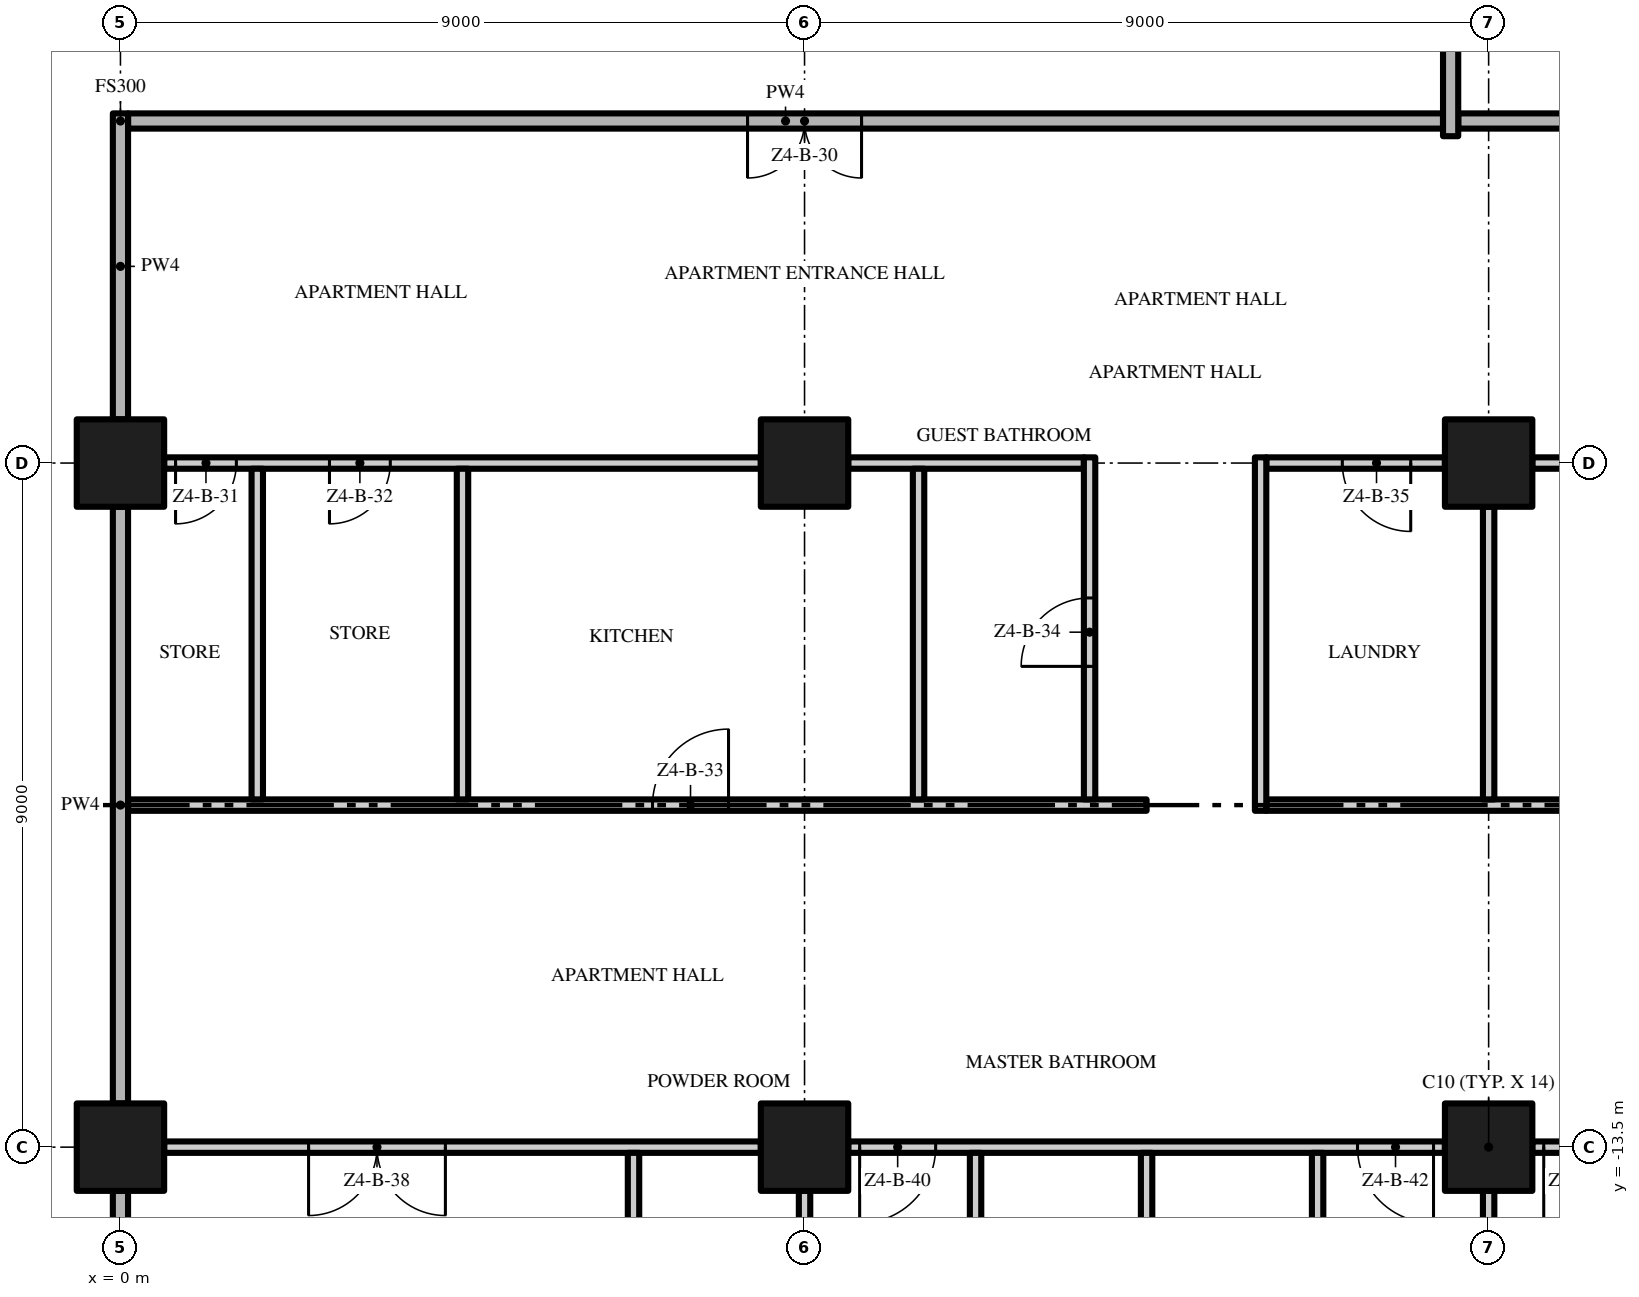
"""IFC4 building model, lengths in metres.
Left out: names, types, materials, properties, quantities, classifications, styles, units other than length and angle.
Written with IfcOpenShell. Run it as: python <this file> out.ifc"""

import sys

from ifc_helpers import new_model, si_unit, direction, frame, frame_2d, origin, origin_2d, place, context, subcontext, project, spatial, rectangle, extrude, element, fill, save


model = new_model("IFC4")
c1 = context("Model", 3, precision=1e-05, world=origin(), true_north=direction((0.0, 1.0)))
c2 = subcontext(c1, "Body", "Model", "MODEL_VIEW")
j1 = project(units=[si_unit("LENGTHUNIT", "METRE"), si_unit("PLANEANGLEUNIT", "RADIAN")], contexts=[c1])
p1 = place(None, origin())
s1 = spatial("IfcSite", under=j1, at=p1, CompositionType="ELEMENT")
p2 = place(p1, origin())
s2 = spatial("IfcBuilding", under=s1, at=p2, CompositionType="ELEMENT")
p3 = place(p2, frame((0.0, 0.0, 195.8)))
s3 = spatial("IfcBuildingStorey", under=s2, at=p3, CompositionType="ELEMENT", Elevation=195.8)
for number, where, z_axis, x_axis in (
    (1, (0.0, -13.5, 0.0), (0.0, 0.0, 1.0), (1.0, 0.0, 0.0)),
    (2, (0.0, -4.5, 0.0), (0.0, 0.0, 1.0), (1.0, 0.0, 0.0)),
    (3, (18.0, -13.5, 0.0), (0.0, 0.0, 1.0), (1.0, 0.0, 0.0)),
    (4, (18.0, -4.5, 0.0), (0.0, 0.0, 1.0), (1.0, 0.0, 0.0)),
    (5, (9.0, -13.5, 0.0), (0.0, 0.0, 1.0), (1.0, 0.0, 0.0)),
    (6, (9.0, -4.5, 0.0), (0.0, 0.0, 1.0), (1.0, 0.0, 0.0)),
):
    element("IfcColumn", number, at=place(p3, frame(where, z_axis=z_axis, x_axis=x_axis)), inside=s3, PredefinedType="COLUMN", context=c2, shape_type="SweptSolid", body=[
        extrude(rectangle(XDim=1.15, YDim=1.15, at=origin_2d()), origin(), (0.0, 0.0, 1.0), 3.5),
    ])
p4 = place(p3, frame((8.425, -13.5, 0.0), z_axis=(0.0, 0.0, 1.0), x_axis=(-1.0, 0.0, 0.0)))
e7 = element("IfcWall", 7, at=p4, inside=s3, PredefinedType="PARTITIONING", context=c2, shape_type="SweptSolid", body=[
    extrude(rectangle(XDim=7.85, YDim=0.15, at=frame_2d((3.925, 0.0))), origin(), (0.0, 0.0, 1.0), 3.5),
])
p5 = place(p4, frame((4.15, 0.0, 0.0)))
e8 = element("IfcOpeningElement", 8, at=p5, cuts=e7, PredefinedType="OPENING", context=c2, shape_type="SweptSolid", body=[
    extrude(rectangle(XDim=1.8, YDim=2.4, at=frame_2d((0.9, 1.2))), frame((0.0, 0.085, 0.0), z_axis=(0.0, -1.0, 0.0), x_axis=(1.0, 0.0, 0.0)), (0.0, 0.0, 1.0), 0.17),
])
p6 = place(p3, frame((17.425, -13.5, 0.0), z_axis=(0.0, 0.0, 1.0), x_axis=(-1.0, 0.0, 0.0)))
e9 = element("IfcWall", 9, at=p6, inside=s3, PredefinedType="PARTITIONING", context=c2, shape_type="SweptSolid", body=[
    extrude(rectangle(XDim=7.85, YDim=0.15, at=frame_2d((3.925, 0.0))), origin(), (0.0, 0.0, 1.0), 3.5),
])
p7 = place(p6, frame((6.7, 0.0, 0.0)))
e10 = element("IfcOpeningElement", 10, at=p7, cuts=e9, PredefinedType="OPENING", context=c2, shape_type="SweptSolid", body=[
    extrude(rectangle(XDim=1.0, YDim=2.4, at=frame_2d((0.5, 1.2))), frame((0.0, 0.085, 0.0), z_axis=(0.0, -1.0, 0.0), x_axis=(1.0, 0.0, 0.0)), (0.0, 0.0, 1.0), 0.17),
])
p8 = place(p6, frame((0.15, 0.0, 0.0)))
e11 = element("IfcOpeningElement", 11, at=p8, cuts=e9, PredefinedType="OPENING", context=c2, shape_type="SweptSolid", body=[
    extrude(rectangle(XDim=1.0, YDim=2.4, at=frame_2d((0.5, 1.2))), frame((0.0, 0.085, 0.0), z_axis=(0.0, -1.0, 0.0), x_axis=(1.0, 0.0, 0.0)), (0.0, 0.0, 1.0), 0.17),
])
p9 = place(p3, frame((25.95, -13.5, 0.0), z_axis=(0.0, 0.0, 1.0), x_axis=(-1.0, 0.0, 0.0)))
e12 = element("IfcWall", 12, at=p9, inside=s3, PredefinedType="PARTITIONING", context=c2, shape_type="SweptSolid", body=[
    extrude(rectangle(XDim=7.375, YDim=0.15, at=frame_2d((3.688, 0.0))), origin(), (0.0, 0.0, 1.0), 3.5),
])
p10 = place(p9, frame((6.225, 0.0, 0.0)))
e13 = element("IfcOpeningElement", 13, at=p10, cuts=e12, PredefinedType="OPENING", context=c2, shape_type="SweptSolid", body=[
    extrude(rectangle(XDim=1.0, YDim=2.4, at=frame_2d((0.5, 1.2))), frame((0.0, 0.085, 0.0), z_axis=(0.0, -1.0, 0.0), x_axis=(1.0, 0.0, 0.0)), (0.0, 0.0, 1.0), 0.17),
])
p11 = place(p9, frame((0.7, 0.0, 0.0)))
e14 = element("IfcOpeningElement", 14, at=p11, cuts=e12, PredefinedType="OPENING", context=c2, shape_type="SweptSolid", body=[
    extrude(rectangle(XDim=1.0, YDim=2.4, at=frame_2d((0.5, 1.2))), frame((0.0, 0.085, 0.0), z_axis=(0.0, -1.0, 0.0), x_axis=(1.0, 0.0, 0.0)), (0.0, 0.0, 1.0), 0.17),
])
p12 = place(p3, frame((0.1, -9.0, 0.0), z_axis=(0.0, 0.0, 1.0), x_axis=(1.0, 0.0, 0.0)))
e15 = element("IfcWall", 15, at=p12, inside=s3, PredefinedType="PARTITIONING", context=c2, shape_type="SweptSolid", body=[
    extrude(rectangle(XDim=13.4, YDim=0.15, at=frame_2d((6.7, 0.0))), origin(), (0.0, 0.0, 1.0), 3.5),
])
p13 = place(p12, frame((6.9, 0.0, 0.0)))
e16 = element("IfcOpeningElement", 16, at=p13, cuts=e15, PredefinedType="OPENING", context=c2, shape_type="SweptSolid", body=[
    extrude(rectangle(XDim=1.0, YDim=2.4, at=frame_2d((0.5, 1.2))), frame((0.0, 0.085, 0.0), z_axis=(0.0, -1.0, 0.0), x_axis=(1.0, 0.0, 0.0)), (0.0, 0.0, 1.0), 0.17),
])
p14 = place(p3, frame((15.075, -9.0, 0.0), z_axis=(0.0, 0.0, 1.0), x_axis=(1.0, 0.0, 0.0)))
e17 = element("IfcWall", 17, at=p14, inside=s3, PredefinedType="PARTITIONING", context=c2, shape_type="SweptSolid", body=[
    extrude(rectangle(XDim=11.625, YDim=0.15, at=frame_2d((5.812, 0.0))), origin(), (0.0, 0.0, 1.0), 3.5),
])
p15 = place(p3, frame((8.425, -4.5, 0.0), z_axis=(0.0, 0.0, 1.0), x_axis=(-1.0, 0.0, 0.0)))
e18 = element("IfcWall", 18, at=p15, inside=s3, PredefinedType="PARTITIONING", context=c2, shape_type="SweptSolid", body=[
    extrude(rectangle(XDim=7.85, YDim=0.15, at=frame_2d((3.925, 0.0))), origin(), (0.0, 0.0, 1.0), 3.5),
])
p16 = place(p15, frame((6.9, 0.0, 0.0)))
e19 = element("IfcOpeningElement", 19, at=p16, cuts=e18, PredefinedType="OPENING", context=c2, shape_type="SweptSolid", body=[
    extrude(rectangle(XDim=0.8, YDim=2.0, at=frame_2d((0.4, 1.0))), frame((0.0, 0.085, 0.0), z_axis=(0.0, -1.0, 0.0), x_axis=(1.0, 0.0, 0.0)), (0.0, 0.0, 1.0), 0.17),
])
p17 = place(p15, frame((4.875, 0.0, 0.0)))
e20 = element("IfcOpeningElement", 20, at=p17, cuts=e18, PredefinedType="OPENING", context=c2, shape_type="SweptSolid", body=[
    extrude(rectangle(XDim=0.8, YDim=2.0, at=frame_2d((0.4, 1.0))), frame((0.0, 0.085, 0.0), z_axis=(0.0, -1.0, 0.0), x_axis=(1.0, 0.0, 0.0)), (0.0, 0.0, 1.0), 0.17),
])
p18 = place(p3, frame((9.575, -4.5, 0.0), z_axis=(0.0, 0.0, 1.0), x_axis=(1.0, 0.0, 0.0)))
e21 = element("IfcWall", 21, at=p18, inside=s3, PredefinedType="PARTITIONING", context=c2, shape_type="SweptSolid", body=[
    extrude(rectangle(XDim=3.1, YDim=0.15, at=frame_2d((1.55, 0.0))), origin(), (0.0, 0.0, 1.0), 3.5),
])
p19 = place(p3, frame((17.425, -4.5, 0.0), z_axis=(0.0, 0.0, 1.0), x_axis=(-1.0, 0.0, 0.0)))
e22 = element("IfcWall", 22, at=p19, inside=s3, PredefinedType="PARTITIONING", context=c2, shape_type="SweptSolid", body=[
    extrude(rectangle(XDim=2.35, YDim=0.15, at=frame_2d((1.175, 0.0))), origin(), (0.0, 0.0, 1.0), 3.5),
])
p20 = place(p19, frame((0.45, 0.0, 0.0)))
e23 = element("IfcOpeningElement", 23, at=p20, cuts=e22, PredefinedType="OPENING", context=c2, shape_type="SweptSolid", body=[
    extrude(rectangle(XDim=0.9, YDim=2.1, at=frame_2d((0.45, 1.05))), frame((0.0, 0.085, 0.0), z_axis=(0.0, -1.0, 0.0), x_axis=(1.0, 0.0, 0.0)), (0.0, 0.0, 1.0), 0.17),
])
p21 = place(p3, frame((25.95, -4.5, 0.0), z_axis=(0.0, 0.0, 1.0), x_axis=(-1.0, 0.0, 0.0)))
e24 = element("IfcWall", 24, at=p21, inside=s3, PredefinedType="PARTITIONING", context=c2, shape_type="SweptSolid", body=[
    extrude(rectangle(XDim=7.375, YDim=0.15, at=frame_2d((3.688, 0.0))), origin(), (0.0, 0.0, 1.0), 3.5),
])
p22 = place(p21, frame((4.875, 0.0, 0.0)))
e25 = element("IfcOpeningElement", 25, at=p22, cuts=e24, PredefinedType="OPENING", context=c2, shape_type="SweptSolid", body=[
    extrude(rectangle(XDim=0.9, YDim=2.1, at=frame_2d((0.45, 1.05))), frame((0.0, 0.085, 0.0), z_axis=(0.0, -1.0, 0.0), x_axis=(1.0, 0.0, 0.0)), (0.0, 0.0, 1.0), 0.17),
])
p23 = place(p3, frame((17.4, 0.0, 0.0), z_axis=(0.0, 0.0, 1.0), x_axis=(-1.0, 0.0, 0.0)))
e26 = element("IfcWall", 26, at=p23, inside=s3, PredefinedType="PARTITIONING", context=c2, shape_type="SweptSolid", body=[
    extrude(rectangle(XDim=17.3, YDim=0.2, at=frame_2d((8.65, 0.0))), origin(), (0.0, 0.0, 1.0), 3.5),
])
p24 = place(p23, frame((7.65, 0.0, 0.0)))
e27 = element("IfcOpeningElement", 27, at=p24, cuts=e26, PredefinedType="OPENING", context=c2, shape_type="SweptSolid", body=[
    extrude(rectangle(XDim=1.5, YDim=2.4, at=frame_2d((0.75, 1.2))), frame((0.0, 0.11, 0.0), z_axis=(0.0, -1.0, 0.0), x_axis=(1.0, 0.0, 0.0)), (0.0, 0.0, 1.0), 0.22),
])
p25 = place(p3, frame((17.6, 0.0, 0.0), z_axis=(0.0, 0.0, 1.0), x_axis=(1.0, 0.0, 0.0)))
e28 = element("IfcWall", 28, at=p25, inside=s3, PredefinedType="PARTITIONING", context=c2, shape_type="SweptSolid", body=[
    extrude(rectangle(XDim=9.1, YDim=0.2, at=frame_2d((4.55, 0.0))), origin(), (0.0, 0.0, 1.0), 3.5),
])
p26 = place(p3, frame((0.0, -21.45, 0.0), z_axis=(0.0, 0.0, 1.0), x_axis=(0.0, 1.0, 0.0)))
e29 = element("IfcWall", 29, at=p26, inside=s3, PredefinedType="PARTITIONING", context=c2, shape_type="SweptSolid", body=[
    extrude(rectangle(XDim=7.375, YDim=0.2, at=frame_2d((3.688, 0.0))), origin(), (0.0, 0.0, 1.0), 3.5),
])
p27 = place(p3, frame((0.0, -12.925, 0.0), z_axis=(0.0, 0.0, 1.0), x_axis=(0.0, 1.0, 0.0)))
e30 = element("IfcWall", 30, at=p27, inside=s3, PredefinedType="PARTITIONING", context=c2, shape_type="SweptSolid", body=[
    extrude(rectangle(XDim=7.85, YDim=0.2, at=frame_2d((3.925, 0.0))), origin(), (0.0, 0.0, 1.0), 3.5),
])
p28 = place(p3, frame((0.0, -3.925, 0.0), z_axis=(0.0, 0.0, 1.0), x_axis=(0.0, 1.0, 0.0)))
e31 = element("IfcWall", 31, at=p28, inside=s3, PredefinedType="PARTITIONING", context=c2, shape_type="SweptSolid", body=[
    extrude(rectangle(XDim=4.025, YDim=0.2, at=frame_2d((2.013, 0.0))), origin(), (0.0, 0.0, 1.0), 3.5),
])
for number, where, z_axis, x_axis in (
    (32, (1.8, -8.925, 0.0), (0.0, 0.0, 1.0), (0.0, 1.0, 0.0)),
    (33, (4.5, -8.925, 0.0), (0.0, 0.0, 1.0), (0.0, 1.0, 0.0)),
):
    element("IfcWall", number, at=place(p3, frame(where, z_axis=z_axis, x_axis=x_axis)), inside=s3, PredefinedType="PARTITIONING", context=c2, shape_type="SweptSolid", body=[
        extrude(rectangle(XDim=4.35, YDim=0.15, at=frame_2d((2.175, 0.0))), origin(), (0.0, 0.0, 1.0), 3.5),
    ])
p29 = place(p3, frame((6.75, -16.575, 0.0), z_axis=(0.0, 0.0, 1.0), x_axis=(0.0, 1.0, 0.0)))
e34 = element("IfcWall", 34, at=p29, inside=s3, PredefinedType="PARTITIONING", context=c2, shape_type="SweptSolid", body=[
    extrude(rectangle(XDim=3.0, YDim=0.15, at=frame_2d((1.5, 0.0))), origin(), (0.0, 0.0, 1.0), 3.5),
])
p30 = place(p3, frame((9.0, -21.45, 0.0), z_axis=(0.0, 0.0, 1.0), x_axis=(0.0, 1.0, 0.0)))
e35 = element("IfcWall", 35, at=p30, inside=s3, PredefinedType="PARTITIONING", context=c2, shape_type="SweptSolid", body=[
    extrude(rectangle(XDim=7.375, YDim=0.15, at=frame_2d((3.688, 0.0))), origin(), (0.0, 0.0, 1.0), 3.5),
])
p31 = place(p3, frame((10.5, -8.925, 0.0), z_axis=(0.0, 0.0, 1.0), x_axis=(0.0, 1.0, 0.0)))
e36 = element("IfcWall", 36, at=p31, inside=s3, PredefinedType="PARTITIONING", context=c2, shape_type="SweptSolid", body=[
    extrude(rectangle(XDim=4.35, YDim=0.15, at=frame_2d((2.175, 0.0))), origin(), (0.0, 0.0, 1.0), 3.5),
])
p32 = place(p3, frame((11.25, -16.575, 0.0), z_axis=(0.0, 0.0, 1.0), x_axis=(0.0, 1.0, 0.0)))
e37 = element("IfcWall", 37, at=p32, inside=s3, PredefinedType="PARTITIONING", context=c2, shape_type="SweptSolid", body=[
    extrude(rectangle(XDim=3.0, YDim=0.15, at=frame_2d((1.5, 0.0))), origin(), (0.0, 0.0, 1.0), 3.5),
])
p33 = place(p3, frame((12.75, -8.925, 0.0), z_axis=(0.0, 0.0, 1.0), x_axis=(0.0, 1.0, 0.0)))
e38 = element("IfcWall", 38, at=p33, inside=s3, PredefinedType="PARTITIONING", context=c2, shape_type="SweptSolid", body=[
    extrude(rectangle(XDim=4.5, YDim=0.15, at=frame_2d((2.25, 0.0))), origin(), (0.0, 0.0, 1.0), 3.5),
])
p34 = place(p33, frame((1.75, 0.0, 0.0)))
e39 = element("IfcOpeningElement", 39, at=p34, cuts=e38, PredefinedType="OPENING", context=c2, shape_type="SweptSolid", body=[
    extrude(rectangle(XDim=0.9, YDim=2.1, at=frame_2d((0.45, 1.05))), frame((0.0, 0.085, 0.0), z_axis=(0.0, -1.0, 0.0), x_axis=(1.0, 0.0, 0.0)), (0.0, 0.0, 1.0), 0.17),
])
p35 = place(p3, frame((13.5, -22.2, 0.0), z_axis=(0.0, 0.0, 1.0), x_axis=(0.0, 1.0, 0.0)))
e40 = element("IfcWall", 40, at=p35, inside=s3, PredefinedType="PARTITIONING", context=c2, shape_type="SweptSolid", body=[
    extrude(rectangle(XDim=8.625, YDim=0.15, at=frame_2d((4.312, 0.0))), origin(), (0.0, 0.0, 1.0), 3.5),
])
p36 = place(p3, frame((15.0, -9.075, 0.0), z_axis=(0.0, 0.0, 1.0), x_axis=(0.0, 1.0, 0.0)))
e41 = element("IfcWall", 41, at=p36, inside=s3, PredefinedType="PARTITIONING", context=c2, shape_type="SweptSolid", body=[
    extrude(rectangle(XDim=4.65, YDim=0.15, at=frame_2d((2.325, 0.0))), origin(), (0.0, 0.0, 1.0), 3.5),
])
p37 = place(p3, frame((15.75, -16.575, 0.0), z_axis=(0.0, 0.0, 1.0), x_axis=(0.0, 1.0, 0.0)))
e42 = element("IfcWall", 42, at=p37, inside=s3, PredefinedType="PARTITIONING", context=c2, shape_type="SweptSolid", body=[
    extrude(rectangle(XDim=3.0, YDim=0.15, at=frame_2d((1.5, 0.0))), origin(), (0.0, 0.0, 1.0), 3.5),
])
p38 = place(p3, frame((17.5, -0.2, 0.0), z_axis=(0.0, 0.0, 1.0), x_axis=(0.0, 1.0, 0.0)))
e43 = element("IfcWall", 43, at=p38, inside=s3, PredefinedType="PARTITIONING", context=c2, shape_type="SweptSolid", body=[
    extrude(rectangle(XDim=4.125, YDim=0.2, at=frame_2d((2.062, 0.0))), origin(), (0.0, 0.0, 1.0), 3.5),
])
p39 = place(p3, frame((18.0, -21.45, 0.0), z_axis=(0.0, 0.0, 1.0), x_axis=(0.0, 1.0, 0.0)))
e44 = element("IfcWall", 44, at=p39, inside=s3, PredefinedType="PARTITIONING", context=c2, shape_type="SweptSolid", body=[
    extrude(rectangle(XDim=7.375, YDim=0.15, at=frame_2d((3.688, 0.0))), origin(), (0.0, 0.0, 1.0), 3.5),
])
p40 = place(p3, frame((18.0, -8.925, 0.0), z_axis=(0.0, 0.0, 1.0), x_axis=(0.0, 1.0, 0.0)))
e45 = element("IfcWall", 45, at=p40, inside=s3, PredefinedType="PARTITIONING", context=c2, shape_type="SweptSolid", body=[
    extrude(rectangle(XDim=3.85, YDim=0.15, at=frame_2d((1.925, 0.0))), origin(), (0.0, 0.0, 1.0), 3.5),
])
p41 = place(p24, origin())
e46 = element("IfcDoor", 46, at=p41, inside=s3, OperationType="DOUBLE_DOOR_SINGLE_SWING", PredefinedType="DOOR", context=c2, shape_type="SweptSolid", body=[
    extrude(rectangle(XDim=1.5, YDim=2.4, at=frame_2d((0.75, 1.2))), frame((0.0, 0.025, 0.0), z_axis=(0.0, -1.0, 0.0), x_axis=(1.0, 0.0, 0.0)), (0.0, 0.0, 1.0), 0.05),
])
fill(e27, e46)
p42 = place(p16, origin())
e47 = element("IfcDoor", 47, at=p42, inside=s3, OperationType="SINGLE_SWING_RIGHT", PredefinedType="DOOR", context=c2, shape_type="SweptSolid", body=[
    extrude(rectangle(XDim=0.8, YDim=2.0, at=frame_2d((0.4, 1.0))), frame((0.0, 0.025, 0.0), z_axis=(0.0, -1.0, 0.0), x_axis=(1.0, 0.0, 0.0)), (0.0, 0.0, 1.0), 0.05),
])
fill(e19, e47)
p43 = place(p17, origin())
e48 = element("IfcDoor", 48, at=p43, inside=s3, OperationType="SINGLE_SWING_RIGHT", PredefinedType="DOOR", context=c2, shape_type="SweptSolid", body=[
    extrude(rectangle(XDim=0.8, YDim=2.0, at=frame_2d((0.4, 1.0))), frame((0.0, 0.025, 0.0), z_axis=(0.0, -1.0, 0.0), x_axis=(1.0, 0.0, 0.0)), (0.0, 0.0, 1.0), 0.05),
])
fill(e20, e48)
p44 = place(p13, origin())
e49 = element("IfcDoor", 49, at=p44, inside=s3, OperationType="SINGLE_SWING_RIGHT", PredefinedType="DOOR", context=c2, shape_type="SweptSolid", body=[
    extrude(rectangle(XDim=1.0, YDim=2.4, at=frame_2d((0.5, 1.2))), frame((0.0, 0.025, 0.0), z_axis=(0.0, -1.0, 0.0), x_axis=(1.0, 0.0, 0.0)), (0.0, 0.0, 1.0), 0.05),
])
fill(e16, e49)
p45 = place(p34, origin())
e50 = element("IfcDoor", 50, at=p45, inside=s3, OperationType="SINGLE_SWING_LEFT", PredefinedType="DOOR", context=c2, shape_type="SweptSolid", body=[
    extrude(rectangle(XDim=0.9, YDim=2.1, at=frame_2d((0.45, 1.05))), frame((0.0, 0.025, 0.0), z_axis=(0.0, -1.0, 0.0), x_axis=(1.0, 0.0, 0.0)), (0.0, 0.0, 1.0), 0.05),
])
fill(e39, e50)
p46 = place(p20, origin())
e51 = element("IfcDoor", 51, at=p46, inside=s3, OperationType="SINGLE_SWING_LEFT", PredefinedType="DOOR", context=c2, shape_type="SweptSolid", body=[
    extrude(rectangle(XDim=0.9, YDim=2.1, at=frame_2d((0.45, 1.05))), frame((0.0, 0.025, 0.0), z_axis=(0.0, -1.0, 0.0), x_axis=(1.0, 0.0, 0.0)), (0.0, 0.0, 1.0), 0.05),
])
fill(e23, e51)
p47 = place(p5, origin())
e52 = element("IfcDoor", 52, at=p47, inside=s3, OperationType="DOUBLE_DOOR_SINGLE_SWING", PredefinedType="DOOR", context=c2, shape_type="SweptSolid", body=[
    extrude(rectangle(XDim=1.8, YDim=2.4, at=frame_2d((0.9, 1.2))), frame((0.0, 0.025, 0.0), z_axis=(0.0, -1.0, 0.0), x_axis=(1.0, 0.0, 0.0)), (0.0, 0.0, 1.0), 0.05),
])
fill(e8, e52)
p48 = place(p7, origin())
e53 = element("IfcDoor", 53, at=p48, inside=s3, OperationType="SINGLE_SWING_RIGHT", PredefinedType="DOOR", context=c2, shape_type="SweptSolid", body=[
    extrude(rectangle(XDim=1.0, YDim=2.4, at=frame_2d((0.5, 1.2))), frame((0.0, 0.025, 0.0), z_axis=(0.0, -1.0, 0.0), x_axis=(1.0, 0.0, 0.0)), (0.0, 0.0, 1.0), 0.05),
])
fill(e10, e53)
p49 = place(p8, origin())
e54 = element("IfcDoor", 54, at=p49, inside=s3, OperationType="SINGLE_SWING_LEFT", PredefinedType="DOOR", context=c2, shape_type="SweptSolid", body=[
    extrude(rectangle(XDim=1.0, YDim=2.4, at=frame_2d((0.5, 1.2))), frame((0.0, 0.025, 0.0), z_axis=(0.0, -1.0, 0.0), x_axis=(1.0, 0.0, 0.0)), (0.0, 0.0, 1.0), 0.05),
])
fill(e11, e54)
p50 = place(p10, origin())
e55 = element("IfcDoor", 55, at=p50, inside=s3, OperationType="SINGLE_SWING_RIGHT", PredefinedType="DOOR", context=c2, shape_type="SweptSolid", body=[
    extrude(rectangle(XDim=1.0, YDim=2.4, at=frame_2d((0.5, 1.2))), frame((0.0, 0.025, 0.0), z_axis=(0.0, -1.0, 0.0), x_axis=(1.0, 0.0, 0.0)), (0.0, 0.0, 1.0), 0.05),
])
fill(e13, e55)
save(model, sys.argv[1])
